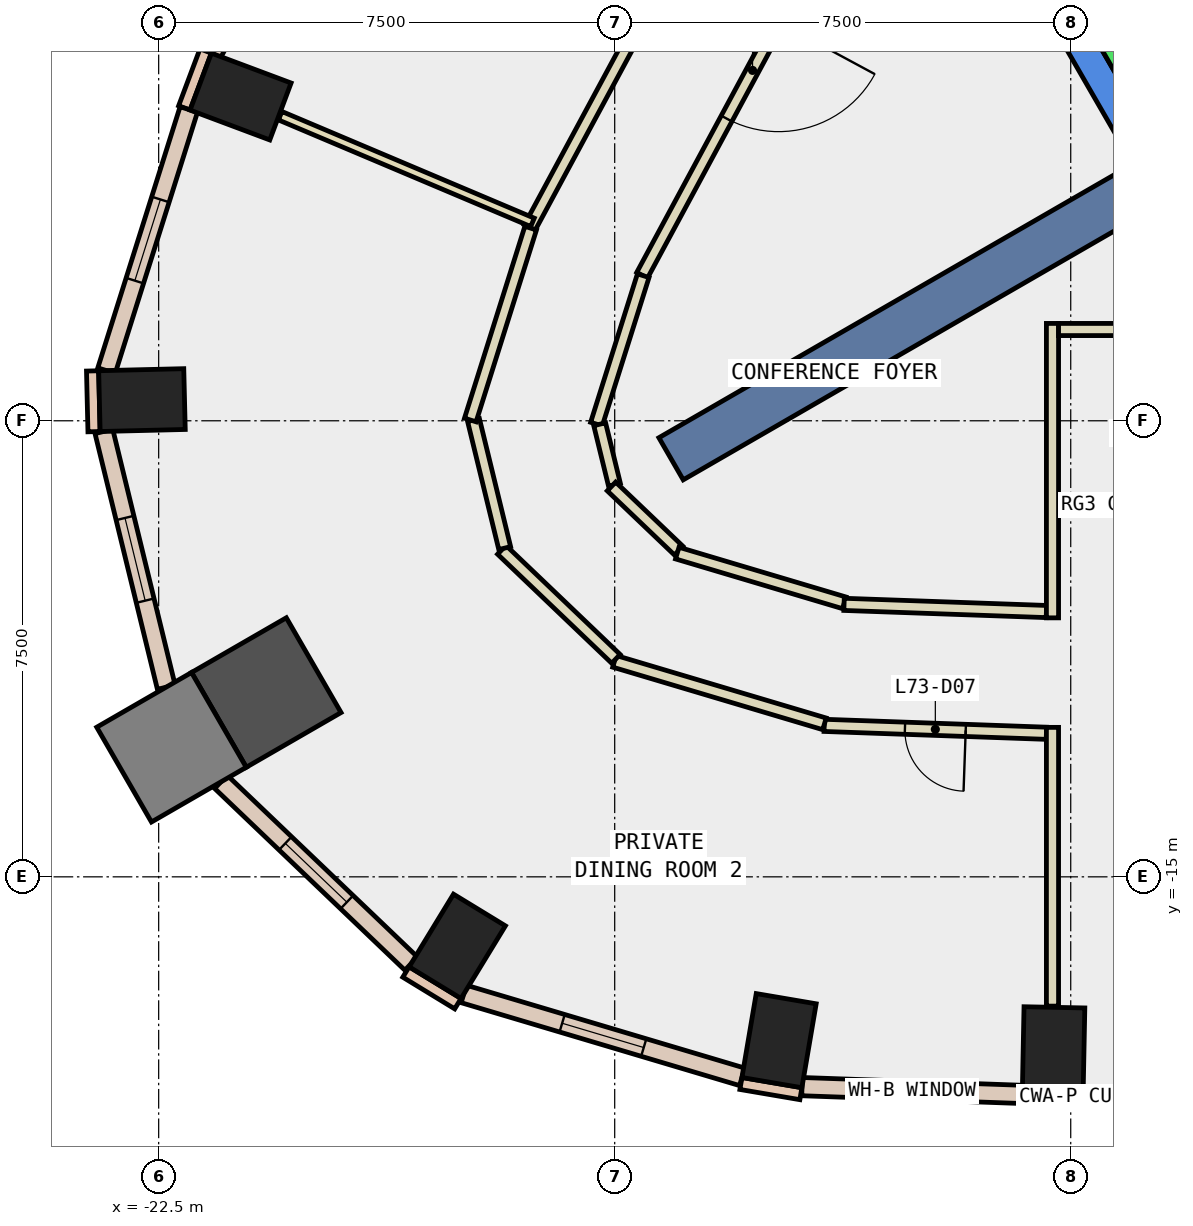
"""IFC4 building model, lengths in metres.
Left out: names, types, materials, properties, quantities, classifications, styles, units other than length and angle.
Written with IfcOpenShell. Run it as: python <this file> out.ifc"""

import sys

from ifc_helpers import new_model, si_unit, direction, frame, frame_2d, origin, origin_2d, place, context, subcontext, project, spatial, polyline, rectangle, outline, extrude, element, fill, save


model = new_model("IFC4")
c1 = context("Model", 3, precision=1e-05, world=origin(), true_north=direction((0.0, 1.0)))
c2 = subcontext(c1, "Body", "Model", "MODEL_VIEW")
j1 = project(units=[si_unit("LENGTHUNIT", "METRE"), si_unit("PLANEANGLEUNIT", "RADIAN")], contexts=[c1])
p1 = place(None, origin())
s1 = spatial("IfcSite", under=j1, at=p1, CompositionType="ELEMENT")
p2 = place(p1, origin())
s2 = spatial("IfcBuilding", under=s1, at=p2, CompositionType="ELEMENT")
p3 = place(p2, frame((0.0, 0.0, 311.6)))
s3 = spatial("IfcBuildingStorey", under=s2, at=p3, CompositionType="ELEMENT", Elevation=311.6)
for number, where, z_axis, x_axis in (
    (1, (-12.297, -17.694, -0.34), (0.0, 0.0, 1.0), (-0.986, 0.168, 0.0)),
    (2, (-7.782, -17.846, -0.34), (0.0, 0.0, 1.0), (-1.0, 0.02, 0.0)),
    (3, (-21.153, -2.168, -0.34), (0.0, 0.0, 1.0), (0.351, 0.936, 0.0)),
    (4, (-22.775, -7.16, -0.34), (0.0, 0.0, 1.0), (-0.024, 1.0, 0.0)),
):
    element("IfcColumn", number, at=place(p3, frame(where, z_axis=z_axis, x_axis=x_axis)), inside=s3, PredefinedType="COLUMN", context=c2, shape_type="SweptSolid", body=[
        extrude(rectangle(XDim=1.0, YDim=1.4, at=origin_2d()), origin(), (0.0, 0.0, 1.0), 3.6),
    ])
p4 = place(p3, frame((-20.73, -11.969, -0.34), z_axis=(0.0, 0.0, 1.0), x_axis=(0.866025403784, 0.5, 0.0)))
e5 = element("IfcColumn", 5, at=p4, inside=s3, PredefinedType="COLUMN", context=c2, shape_type="SweptSolid", body=[
    extrude(rectangle(XDim=1.8, YDim=1.8, at=origin_2d()), origin(), (0.0, 0.0, 1.0), 3.6),
])
p5 = place(p3, frame((-17.589, -16.143, -0.34), z_axis=(0.0, 0.0, 1.0), x_axis=(-0.853650808213, 0.520845752251, 0.0)))
e6 = element("IfcColumn", 6, at=p5, inside=s3, PredefinedType="COLUMN", context=c2, shape_type="SweptSolid", body=[
    extrude(rectangle(XDim=1.0, YDim=1.4, at=origin_2d()), origin(), (0.0, 0.0, 1.0), 3.6),
])
p6 = place(p3, frame((-22.289, -12.869, -0.34), z_axis=(0.0, 0.0, 1.0), x_axis=(0.866025403784, 0.5, 0.0)))
e7 = element("IfcColumn", 7, at=p6, inside=s3, PredefinedType="COLUMN", context=c2, shape_type="SweptSolid", body=[
    extrude(rectangle(XDim=1.8, YDim=1.8, at=origin_2d()), origin(), (0.0, 0.0, 1.0), 3.6),
])
p7 = place(p3, frame((0.0, 0.0, -0.34)))
e8 = element("IfcWall", 8, at=p7, inside=s3, PredefinedType="SHEAR", context=c2, shape_type="SweptSolid", body=[
    extrude(outline(polyline([(-9.815, 2.5), (-4.907, -6.0), (-4.619, -5.5), (-9.238, 2.5), (-9.815, 2.5)])), origin(), (0.0, 0.0, 1.0), 3.6),
])
p8 = place(p3, frame((-6.279, -3.625, -0.34), z_axis=(0.0, 0.0, 1.0), x_axis=(-0.866017533419, -0.500013631625, 0.0)))
e9 = element("IfcWall", 9, at=p8, inside=s3, PredefinedType="SHEAR", context=c2, shape_type="SweptSolid", body=[
    extrude(rectangle(XDim=9.0, YDim=0.8, at=frame_2d((4.5, 0.0))), origin(), (0.0, 0.0, 1.0), 3.6),
])
p9 = place(p3, frame((-21.727, -1.419, 0.0), z_axis=(0.0, 0.0, 1.0), x_axis=(-0.350962844851, -0.936389385637, 0.0)))
e10 = element("IfcWall", 10, at=p9, inside=s3, PredefinedType="STANDARD", context=c2, shape_type="SweptSolid", body=[
    extrude(rectangle(XDim=1.0, YDim=0.2, at=frame_2d((0.5, 0.0))), origin(), (0.0, 0.0, 1.0), 3.26),
])
for number, where, z_axis, x_axis in (
    (11, (-12.924, -18.398, 0.0), (0.0, 0.0, 1.0), (0.986, -0.168, 0.0)),
    (12, (-8.298, -18.636, 0.0), (0.0, 0.0, 1.0), (1.0, -0.02, 0.0)),
):
    element("IfcWall", number, at=place(p3, frame(where, z_axis=z_axis, x_axis=x_axis)), inside=s3, PredefinedType="STANDARD", context=c2, shape_type="SweptSolid", body=[
        extrude(rectangle(XDim=1.0, YDim=0.2, at=frame_2d((0.5, 0.0))), origin(), (0.0, 0.0, 1.0), 3.26),
    ])
p10 = place(p3, frame((-23.587, -6.68, 0.0), z_axis=(0.0, 0.0, 1.0), x_axis=(0.023942303888, -0.999713341956, 0.0)))
e13 = element("IfcWall", 13, at=p10, inside=s3, PredefinedType="STANDARD", context=c2, shape_type="SweptSolid", body=[
    extrude(rectangle(XDim=0.999, YDim=0.2, at=frame_2d((0.5, 0.0))), origin(), (0.0, 0.0, 1.0), 3.26),
])
p11 = place(p3, frame((-18.433, -16.565, 0.0), z_axis=(0.0, 0.0, 1.0), x_axis=(0.853679739553, -0.520798331677, 0.0)))
e14 = element("IfcWall", 14, at=p11, inside=s3, PredefinedType="STANDARD", context=c2, shape_type="SweptSolid", body=[
    extrude(rectangle(XDim=1.0, YDim=0.2, at=frame_2d((0.5, 0.0))), origin(), (0.0, 0.0, 1.0), 3.26),
])
p12 = place(p3, frame((-11.919, -18.45, 0.0), z_axis=(0.0, 0.0, 1.0), x_axis=(0.999377185233, -0.035287981473, 0.0)))
e15 = element("IfcWall", 15, at=p12, inside=s3, PredefinedType="STANDARD", context=c2, shape_type="SweptSolid", body=[
    extrude(rectangle(XDim=3.625, YDim=0.3, at=frame_2d((1.812, 0.0))), origin(), (0.0, 0.0, 1.0), 3.26),
])
p13 = place(p12, frame((1.113, 0.0, 0.9)))
e16 = element("IfcOpeningElement", 16, at=p13, cuts=e15, PredefinedType="OPENING", context=c2, shape_type="SweptSolid", body=[
    extrude(rectangle(XDim=1.4, YDim=2.0, at=frame_2d((0.7, 1.0))), frame((0.0, 0.16, 0.0), z_axis=(0.0, -1.0, 0.0), x_axis=(1.0, 0.0, 0.0)), (0.0, 0.0, 1.0), 0.32),
])
p14 = place(p3, frame((-18.097, 5.066, 0.0), z_axis=(0.0, 0.0, 1.0), x_axis=(-0.474421773145, -0.880297666228, 0.0)))
e17 = element("IfcWall", 17, at=p14, inside=s3, PredefinedType="STANDARD", context=c2, shape_type="SweptSolid", body=[
    extrude(rectangle(XDim=7.416, YDim=0.3, at=frame_2d((3.708, 0.0))), origin(), (0.0, 0.0, 1.0), 3.26),
])
p15 = place(p14, frame((0.754, 0.0, 0.9)))
e18 = element("IfcOpeningElement", 18, at=p15, cuts=e17, PredefinedType="OPENING", context=c2, shape_type="SweptSolid", body=[
    extrude(rectangle(XDim=2.2, YDim=2.0, at=frame_2d((1.1, 1.0))), frame((0.0, 0.16, 0.0), z_axis=(0.0, -1.0, 0.0), x_axis=(1.0, 0.0, 0.0)), (0.0, 0.0, 1.0), 0.32),
])
p16 = place(p14, frame((4.462, 0.0, 0.9)))
e19 = element("IfcOpeningElement", 19, at=p16, cuts=e17, PredefinedType="OPENING", context=c2, shape_type="SweptSolid", body=[
    extrude(rectangle(XDim=2.2, YDim=2.0, at=frame_2d((1.1, 1.0))), frame((0.0, 0.16, 0.0), z_axis=(0.0, -1.0, 0.0), x_axis=(1.0, 0.0, 0.0)), (0.0, 0.0, 1.0), 0.32),
])
p17 = place(p3, frame((-22.005, -2.381, 0.0), z_axis=(0.0, 0.0, 1.0), x_axis=(-0.300534385574, -0.953770980418, 0.0)))
e20 = element("IfcWall", 20, at=p17, inside=s3, PredefinedType="STANDARD", context=c2, shape_type="SweptSolid", body=[
    extrude(rectangle(XDim=4.502, YDim=0.3, at=frame_2d((2.251, 0.0))), origin(), (0.0, 0.0, 1.0), 3.26),
])
p18 = place(p17, frame((1.551, 0.0, 0.9)))
e21 = element("IfcOpeningElement", 21, at=p18, cuts=e20, PredefinedType="OPENING", context=c2, shape_type="SweptSolid", body=[
    extrude(rectangle(XDim=1.4, YDim=2.0, at=frame_2d((0.7, 1.0))), frame((0.0, 0.16, 0.0), z_axis=(0.0, -1.0, 0.0), x_axis=(1.0, 0.0, 0.0)), (0.0, 0.0, 1.0), 0.32),
])
p19 = place(p3, frame((-23.401, -7.675, 0.0), z_axis=(0.0, 0.0, 1.0), x_axis=(0.236958776561, -0.971519705519, 0.0)))
e22 = element("IfcWall", 22, at=p19, inside=s3, PredefinedType="STANDARD", context=c2, shape_type="SweptSolid", body=[
    extrude(rectangle(XDim=4.329, YDim=0.3, at=frame_2d((2.165, 0.0))), origin(), (0.0, 0.0, 1.0), 3.26),
])
p20 = place(p19, frame((1.465, 0.0, 0.9)))
e23 = element("IfcOpeningElement", 23, at=p20, cuts=e22, PredefinedType="OPENING", context=c2, shape_type="SweptSolid", body=[
    extrude(rectangle(XDim=1.4, YDim=2.0, at=frame_2d((0.7, 1.0))), frame((0.0, 0.16, 0.0), z_axis=(0.0, -1.0, 0.0), x_axis=(1.0, 0.0, 0.0)), (0.0, 0.0, 1.0), 0.32),
])
p21 = place(p3, frame((-21.476, -13.438, 0.0), z_axis=(0.0, 0.0, 1.0), x_axis=(0.723113419412, -0.690729312152, 0.0)))
e24 = element("IfcWall", 24, at=p21, inside=s3, PredefinedType="STANDARD", context=c2, shape_type="SweptSolid", body=[
    extrude(rectangle(XDim=4.327, YDim=0.3, at=frame_2d((2.164, 0.0))), origin(), (0.0, 0.0, 1.0), 3.26),
])
p22 = place(p21, frame((1.464, 0.0, 0.9)))
e25 = element("IfcOpeningElement", 25, at=p22, cuts=e24, PredefinedType="OPENING", context=c2, shape_type="SweptSolid", body=[
    extrude(rectangle(XDim=1.4, YDim=2.0, at=frame_2d((0.7, 1.0))), frame((0.0, 0.16, 0.0), z_axis=(0.0, -1.0, 0.0), x_axis=(1.0, 0.0, 0.0)), (0.0, 0.0, 1.0), 0.32),
])
p23 = place(p3, frame((-17.482, -16.926, 0.0), z_axis=(0.0, 0.0, 1.0), x_axis=(0.95841929886, -0.285363711031, 0.0)))
e26 = element("IfcWall", 26, at=p23, inside=s3, PredefinedType="STANDARD", context=c2, shape_type="SweptSolid", body=[
    extrude(rectangle(XDim=4.777, YDim=0.3, at=frame_2d((2.388, 0.0))), origin(), (0.0, 0.0, 1.0), 3.26),
])
p24 = place(p23, frame((1.688, 0.0, 0.9)))
e27 = element("IfcOpeningElement", 27, at=p24, cuts=e26, PredefinedType="OPENING", context=c2, shape_type="SweptSolid", body=[
    extrude(rectangle(XDim=1.4, YDim=2.0, at=frame_2d((0.7, 1.0))), frame((0.0, 0.16, 0.0), z_axis=(0.0, -1.0, 0.0), x_axis=(1.0, 0.0, 0.0)), (0.0, 0.0, 1.0), 0.32),
])
p25 = place(p3, frame((-10.917, 1.631, 0.0), z_axis=(0.0, 0.0, 1.0), x_axis=(-0.47449538478, -0.880257990491, 0.0)))
e28 = element("IfcWall", 28, at=p25, inside=s3, PredefinedType="PARTITIONING", context=c2, shape_type="SweptSolid", body=[
    extrude(rectangle(XDim=7.655, YDim=0.2, at=frame_2d((3.827, 0.0))), origin(), (0.0, 0.0, 1.0), 3.26),
])
p26 = place(p25, frame((2.927, 0.0, 0.0)))
e29 = element("IfcOpeningElement", 29, at=p26, cuts=e28, PredefinedType="OPENING", context=c2, shape_type="SweptSolid", body=[
    extrude(rectangle(XDim=1.8, YDim=2.1, at=frame_2d((0.9, 1.05))), frame((0.0, 0.11, 0.0), z_axis=(0.0, -1.0, 0.0), x_axis=(1.0, 0.0, 0.0)), (0.0, 0.0, 1.0), 0.22),
])
p27 = place(p3, frame((-14.531, -5.114, 0.0), z_axis=(0.0, 0.0, 1.0), x_axis=(-0.300501248013, -0.953781421471, 0.0)))
e30 = element("IfcWall", 30, at=p27, inside=s3, PredefinedType="PARTITIONING", context=c2, shape_type="SweptSolid", body=[
    extrude(rectangle(XDim=2.559, YDim=0.2, at=frame_2d((1.28, 0.0))), origin(), (0.0, 0.0, 1.0), 3.26),
])
p28 = place(p3, frame((-15.247, -7.557, 0.0), z_axis=(0.0, 0.0, 1.0), x_axis=(0.237373129266, -0.971418549083, 0.0)))
e31 = element("IfcWall", 31, at=p28, inside=s3, PredefinedType="PARTITIONING", context=c2, shape_type="SweptSolid", body=[
    extrude(rectangle(XDim=1.024, YDim=0.2, at=frame_2d((0.512, 0.0))), origin(), (0.0, 0.0, 1.0), 3.26),
])
p29 = place(p3, frame((-15.053, -8.58, 0.0), z_axis=(0.0, 0.0, 1.0), x_axis=(0.723283043556, -0.690551691696, 0.0)))
e32 = element("IfcWall", 32, at=p29, inside=s3, PredefinedType="PARTITIONING", context=c2, shape_type="SweptSolid", body=[
    extrude(rectangle(XDim=1.529, YDim=0.2, at=frame_2d((0.765, 0.0))), origin(), (0.0, 0.0, 1.0), 3.26),
])
p30 = place(p3, frame((-13.971, -9.676, 0.0), z_axis=(0.0, 0.0, 1.0), x_axis=(0.958417413979, -0.285370041492, 0.0)))
e33 = element("IfcWall", 33, at=p30, inside=s3, PredefinedType="PARTITIONING", context=c2, shape_type="SweptSolid", body=[
    extrude(rectangle(XDim=2.866, YDim=0.2, at=frame_2d((1.433, 0.0))), origin(), (0.0, 0.0, 1.0), 3.26),
])
p31 = place(p3, frame((-11.228, -10.519, 0.0), z_axis=(0.0, 0.0, 1.0), x_axis=(0.999372900517, -0.035409119054, 0.0)))
e34 = element("IfcWall", 34, at=p31, inside=s3, PredefinedType="PARTITIONING", context=c2, shape_type="SweptSolid", body=[
    extrude(rectangle(XDim=3.33, YDim=0.2, at=frame_2d((1.665, 0.0))), origin(), (0.0, 0.0, 1.0), 3.26),
])
p32 = place(p3, frame((-16.399, -4.325, 0.0), z_axis=(0.0, 0.0, 1.0), x_axis=(0.474489967676, 0.880260910512, 0.0)))
e35 = element("IfcWall", 35, at=p32, inside=s3, PredefinedType="PARTITIONING", context=c2, shape_type="SweptSolid", body=[
    extrude(rectangle(XDim=7.948, YDim=0.2, at=frame_2d((3.974, 0.0))), origin(), (0.0, 0.0, 1.0), 3.26),
])
p33 = place(p32, frame((3.474, 0.0, 0.0)))
e36 = element("IfcOpeningElement", 36, at=p33, cuts=e35, PredefinedType="OPENING", context=c2, shape_type="SweptSolid", body=[
    extrude(rectangle(XDim=1.0, YDim=2.1, at=frame_2d((0.5, 1.05))), frame((0.0, 0.11, 0.0), z_axis=(0.0, -1.0, 0.0), x_axis=(1.0, 0.0, 0.0)), (0.0, 0.0, 1.0), 0.22),
])
p34 = place(p3, frame((-7.9, -12.639, 0.0), z_axis=(0.0, 0.0, 1.0), x_axis=(-0.999368879246, 0.035522432268, 0.0)))
e37 = element("IfcWall", 37, at=p34, inside=s3, PredefinedType="PARTITIONING", context=c2, shape_type="SweptSolid", body=[
    extrude(rectangle(XDim=3.656, YDim=0.2, at=frame_2d((1.828, 0.0))), origin(), (0.0, 0.0, 1.0), 3.26),
])
p35 = place(p34, frame((1.328, 0.0, 0.0)))
e38 = element("IfcOpeningElement", 38, at=p35, cuts=e37, PredefinedType="OPENING", context=c2, shape_type="SweptSolid", body=[
    extrude(rectangle(XDim=1.0, YDim=2.1, at=frame_2d((0.5, 1.05))), frame((0.0, 0.11, 0.0), z_axis=(0.0, -1.0, 0.0), x_axis=(1.0, 0.0, 0.0)), (0.0, 0.0, 1.0), 0.22),
])
p36 = place(p3, frame((-11.55, -12.484, 0.0), z_axis=(0.0, 0.0, 1.0), x_axis=(-0.958459796003, 0.285227662485, 0.0)))
e39 = element("IfcWall", 39, at=p36, inside=s3, PredefinedType="PARTITIONING", context=c2, shape_type="SweptSolid", body=[
    extrude(rectangle(XDim=3.604, YDim=0.2, at=frame_2d((1.802, 0.0))), origin(), (0.0, 0.0, 1.0), 3.26),
])
p37 = place(p3, frame((-14.98, -11.415, 0.0), z_axis=(0.0, 0.0, 1.0), x_axis=(-0.723099256445, 0.690744138831, 0.0)))
e40 = element("IfcWall", 40, at=p37, inside=s3, PredefinedType="PARTITIONING", context=c2, shape_type="SweptSolid", body=[
    extrude(rectangle(XDim=2.596, YDim=0.2, at=frame_2d((1.298, 0.0))), origin(), (0.0, 0.0, 1.0), 3.26),
])
p38 = place(p3, frame((-16.809, -9.594, 0.0), z_axis=(0.0, 0.0, 1.0), x_axis=(-0.23664760587, 0.971595548897, 0.0)))
e41 = element("IfcWall", 41, at=p38, inside=s3, PredefinedType="PARTITIONING", context=c2, shape_type="SweptSolid", body=[
    extrude(rectangle(XDim=2.167, YDim=0.2, at=frame_2d((1.084, 0.0))), origin(), (0.0, 0.0, 1.0), 3.26),
])
p39 = place(p3, frame((-17.375, -7.487, 0.0), z_axis=(0.0, 0.0, 1.0), x_axis=(0.300195088058, 0.953877827138, 0.0)))
e42 = element("IfcWall", 42, at=p39, inside=s3, PredefinedType="PARTITIONING", context=c2, shape_type="SweptSolid", body=[
    extrude(rectangle(XDim=3.308, YDim=0.2, at=frame_2d((1.654, 0.0))), origin(), (0.0, 0.0, 1.0), 3.26),
])
p40 = place(p3, frame((-7.8, -10.741, 0.0), z_axis=(0.0, 0.0, 1.0), x_axis=(0.0, 1.0, 0.0)))
e43 = element("IfcWall", 43, at=p40, inside=s3, PredefinedType="PARTITIONING", context=c2, shape_type="SweptSolid", body=[
    extrude(rectangle(XDim=4.842, YDim=0.2, at=frame_2d((2.421, 0.0))), origin(), (0.0, 0.0, 1.0), 3.26),
])
p41 = place(p3, frame((-7.7, -5.999, 0.0), z_axis=(0.0, 0.0, 1.0), x_axis=(1.0, 0.0, 0.0)))
e44 = element("IfcWall", 44, at=p41, inside=s3, PredefinedType="PARTITIONING", context=c2, shape_type="SweptSolid", body=[
    extrude(rectangle(XDim=2.792, YDim=0.2, at=frame_2d((1.396, 0.0))), origin(), (0.0, 0.0, 1.0), 3.26),
])
p42 = place(p3, frame((-7.8, -17.126, 0.0), z_axis=(0.0, 0.0, 1.0), x_axis=(0.0, 1.0, 0.0)))
e45 = element("IfcWall", 45, at=p42, inside=s3, PredefinedType="PARTITIONING", context=c2, shape_type="SweptSolid", body=[
    extrude(rectangle(XDim=4.584, YDim=0.2, at=frame_2d((2.292, 0.0))), origin(), (0.0, 0.0, 1.0), 3.26),
])
p43 = place(p3, frame((-16.352, -4.237, 0.0), z_axis=(0.0, 0.0, 1.0), x_axis=(-0.921092849348, 0.389342988738, 0.0)))
e46 = element("IfcWall", 46, at=p43, inside=s3, PredefinedType="PARTITIONING", context=c2, shape_type="SweptSolid", body=[
    extrude(rectangle(XDim=4.505, YDim=0.15, at=frame_2d((2.253, 0.0))), origin(), (0.0, 0.0, 1.0), 3.26),
])
p44 = place(p3, frame((-8.192, 0.888, 0.0), z_axis=(0.0, 0.0, 1.0), x_axis=(0.500034260056, -0.866005622828, 0.0)))
e47 = element("IfcWall", 47, at=p44, inside=s3, PredefinedType="STANDARD", context=c2, shape_type="SweptSolid", body=[
    extrude(rectangle(XDim=5.399, YDim=0.2, at=frame_2d((2.7, 0.0))), origin(), (0.0, 0.0, 1.0), 3.26),
])
p45 = place(p3, frame((-4.677, -0.2, 0.0), z_axis=(0.0, 0.0, 1.0), x_axis=(-0.865973769406, -0.500089422704, 0.0)))
e48 = element("IfcWall", 48, at=p45, inside=s3, PredefinedType="STANDARD", context=c2, shape_type="SweptSolid", body=[
    extrude(rectangle(XDim=2.399, YDim=0.2, at=frame_2d((1.2, 0.0))), origin(), (0.0, 0.0, 1.0), 3.26),
])
p46 = place(p13, origin())
e49 = element("IfcWindow", 49, at=p46, inside=s3, PartitioningType="SINGLE_PANEL", PredefinedType="WINDOW", context=c2, shape_type="SweptSolid", body=[
    extrude(rectangle(XDim=1.4, YDim=2.0, at=frame_2d((0.7, 1.0))), frame((0.0, 0.03, 0.0), z_axis=(0.0, -1.0, 0.0), x_axis=(1.0, 0.0, 0.0)), (0.0, 0.0, 1.0), 0.06),
])
fill(e16, e49)
p47 = place(p18, origin())
e50 = element("IfcWindow", 50, at=p47, inside=s3, PartitioningType="SINGLE_PANEL", PredefinedType="WINDOW", context=c2, shape_type="SweptSolid", body=[
    extrude(rectangle(XDim=1.4, YDim=2.0, at=frame_2d((0.7, 1.0))), frame((0.0, 0.03, 0.0), z_axis=(0.0, -1.0, 0.0), x_axis=(1.0, 0.0, 0.0)), (0.0, 0.0, 1.0), 0.06),
])
fill(e21, e50)
p48 = place(p20, origin())
e51 = element("IfcWindow", 51, at=p48, inside=s3, PartitioningType="SINGLE_PANEL", PredefinedType="WINDOW", context=c2, shape_type="SweptSolid", body=[
    extrude(rectangle(XDim=1.4, YDim=2.0, at=frame_2d((0.7, 1.0))), frame((0.0, 0.03, 0.0), z_axis=(0.0, -1.0, 0.0), x_axis=(1.0, 0.0, 0.0)), (0.0, 0.0, 1.0), 0.06),
])
fill(e23, e51)
p49 = place(p22, origin())
e52 = element("IfcWindow", 52, at=p49, inside=s3, PartitioningType="SINGLE_PANEL", PredefinedType="WINDOW", context=c2, shape_type="SweptSolid", body=[
    extrude(rectangle(XDim=1.4, YDim=2.0, at=frame_2d((0.7, 1.0))), frame((0.0, 0.03, 0.0), z_axis=(0.0, -1.0, 0.0), x_axis=(1.0, 0.0, 0.0)), (0.0, 0.0, 1.0), 0.06),
])
fill(e25, e52)
p50 = place(p24, origin())
e53 = element("IfcWindow", 53, at=p50, inside=s3, PartitioningType="SINGLE_PANEL", PredefinedType="WINDOW", context=c2, shape_type="SweptSolid", body=[
    extrude(rectangle(XDim=1.4, YDim=2.0, at=frame_2d((0.7, 1.0))), frame((0.0, 0.03, 0.0), z_axis=(0.0, -1.0, 0.0), x_axis=(1.0, 0.0, 0.0)), (0.0, 0.0, 1.0), 0.06),
])
fill(e27, e53)
p51 = place(p35, origin())
e54 = element("IfcDoor", 54, at=p51, inside=s3, OperationType="SINGLE_SWING_LEFT", PredefinedType="DOOR", context=c2, shape_type="SweptSolid", body=[
    extrude(rectangle(XDim=1.0, YDim=2.1, at=frame_2d((0.5, 1.05))), frame((0.0, 0.025, 0.0), z_axis=(0.0, -1.0, 0.0), x_axis=(1.0, 0.0, 0.0)), (0.0, 0.0, 1.0), 0.05),
])
fill(e38, e54)
p52 = place(p26, origin())
e55 = element("IfcDoor", 55, at=p52, inside=s3, OperationType="DOUBLE_DOOR_SINGLE_SWING", PredefinedType="DOOR", context=c2, shape_type="SweptSolid", body=[
    extrude(rectangle(XDim=1.8, YDim=2.1, at=frame_2d((0.9, 1.05))), frame((0.0, 0.025, 0.0), z_axis=(0.0, -1.0, 0.0), x_axis=(1.0, 0.0, 0.0)), (0.0, 0.0, 1.0), 0.05),
])
fill(e29, e55)
save(model, sys.argv[1])
